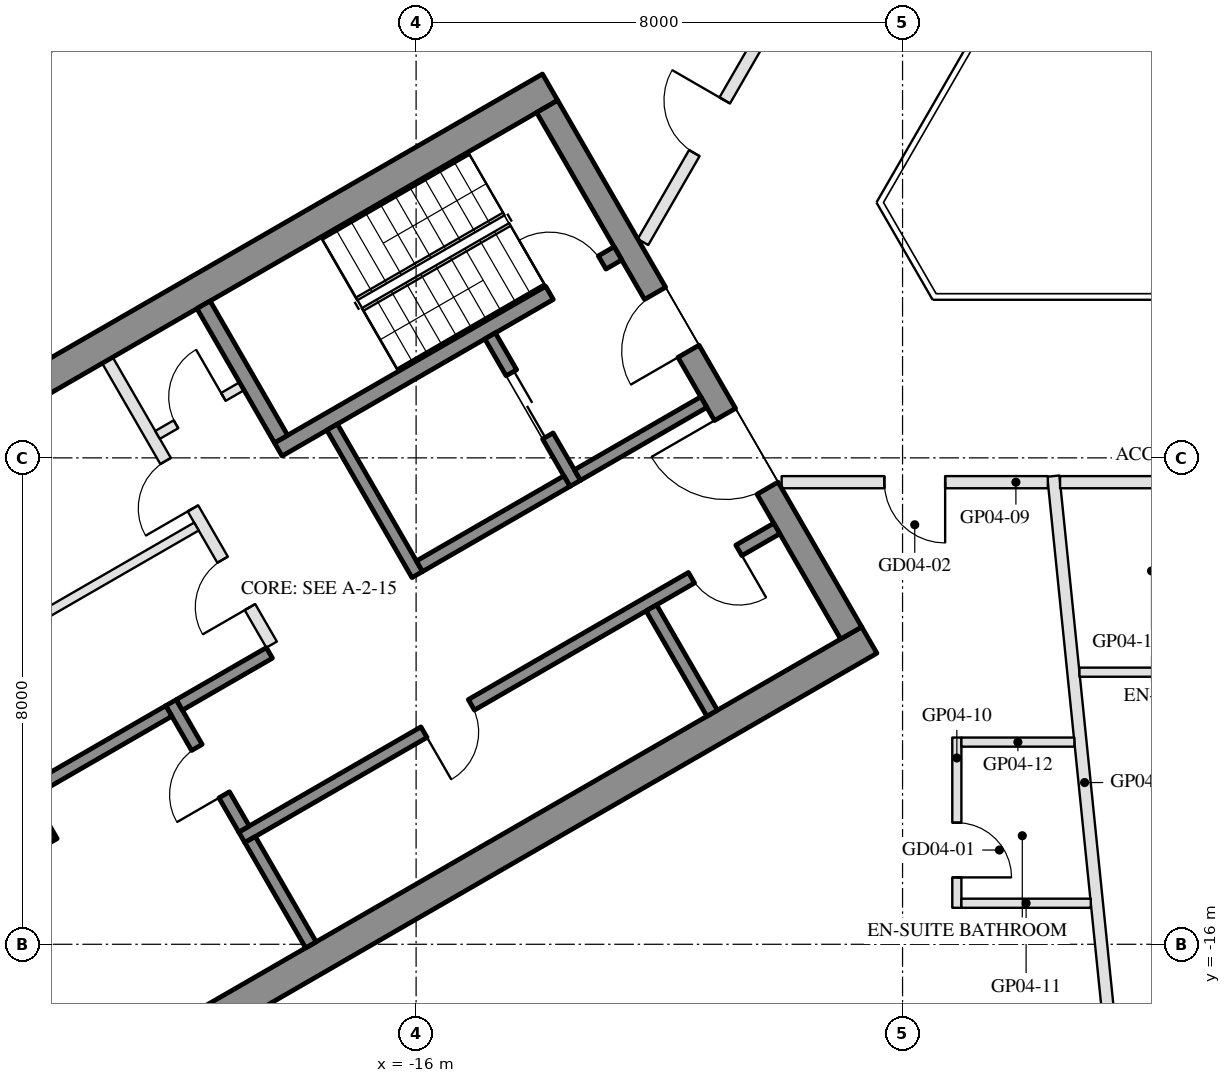
"""IFC4 building model, lengths in metres.
Left out: names, types, materials, properties, quantities, classifications, styles, units other than length and angle.
Written with IfcOpenShell. Run it as: python <this file> out.ifc"""

import sys

from ifc_helpers import new_model, si_unit, direction, frame, frame_2d, origin, origin_2d, place, context, subcontext, project, spatial, rectangle, hollow_rectangle, extrude, element, fill, save


model = new_model("IFC4")
c1 = context("Model", 3, precision=1e-05, world=origin(), true_north=direction((0.0, 1.0)))
c2 = subcontext(c1, "Body", "Model", "MODEL_VIEW")
j1 = project(units=[si_unit("LENGTHUNIT", "METRE"), si_unit("PLANEANGLEUNIT", "RADIAN")], contexts=[c1])
p1 = place(None, origin())
s1 = spatial("IfcSite", under=j1, at=p1, CompositionType="ELEMENT")
p2 = place(p1, origin())
s2 = spatial("IfcBuilding", under=s1, at=p2, CompositionType="ELEMENT")
p3 = place(p2, frame((0.0, 0.0, 76.1)))
s3 = spatial("IfcBuildingStorey", under=s2, at=p3, CompositionType="ELEMENT", Elevation=76.1)
p4 = place(p3, frame((-23.643, -13.65, 0.0), z_axis=(0.0, 0.0, 1.0), x_axis=(-0.5, 0.866025403784, 0.0)))
e1 = element("IfcColumn", 1, at=p4, inside=s3, PredefinedType="COLUMN", context=c2, shape_type="SweptSolid", body=[
    extrude(hollow_rectangle(XDim=2.8, YDim=2.4, WallThickness=0.07, at=origin_2d()), origin(), (0.0, 0.0, 1.0), 3.7),
])
p5 = place(p3, frame((-20.309, 1.934, 0.0), z_axis=(0.0, 0.0, 1.0), x_axis=(-0.499992114976, -0.866029956157, 0.0)))
e2 = element("IfcWall", 2, at=p5, inside=s3, PredefinedType="SOLIDWALL", context=c2, shape_type="SweptSolid", body=[
    extrude(rectangle(XDim=6.74, YDim=0.35, at=frame_2d((3.37, 0.0))), origin(), (0.0, 0.0, 1.0), 3.55),
])
p6 = place(p5, frame((0.32, 0.0, 0.0)))
e3 = element("IfcOpeningElement", 3, at=p6, cuts=e2, PredefinedType="OPENING", context=c2, shape_type="SweptSolid", body=[
    extrude(rectangle(XDim=2.4, YDim=2.4, at=frame_2d((1.2, 1.2))), frame((0.0, 0.185, 0.0), z_axis=(0.0, -1.0, 0.0), x_axis=(1.0, 0.0, 0.0)), (0.0, 0.0, 1.0), 0.37),
])
p7 = place(p5, frame((3.02, 0.0, 0.3)))
e4 = element("IfcOpeningElement", 4, at=p7, cuts=e2, PredefinedType="OPENING", context=c2, shape_type="SweptSolid", body=[
    extrude(rectangle(XDim=1.5, YDim=2.65, at=frame_2d((0.75, 1.325))), frame((0.0, 0.185, 0.0), z_axis=(0.0, -1.0, 0.0), x_axis=(1.0, 0.0, 0.0)), (0.0, 0.0, 1.0), 0.37),
])
p8 = place(p5, frame((4.82, 0.0, 0.3)))
e5 = element("IfcOpeningElement", 5, at=p8, cuts=e2, PredefinedType="OPENING", context=c2, shape_type="SweptSolid", body=[
    extrude(rectangle(XDim=1.5, YDim=2.65, at=frame_2d((0.75, 1.325))), frame((0.0, 0.185, 0.0), z_axis=(0.0, -1.0, 0.0), x_axis=(1.0, 0.0, 0.0)), (0.0, 0.0, 1.0), 0.37),
])
for number, where, z_axis, x_axis in (
    (6, (-13.797, -1.903, 0.0), (0.0, 0.0, 1.0), (-0.866, -0.5, 0.0)),
    (7, (-8.547, -10.997, 0.0), (0.0, 0.0, 1.0), (-0.866, -0.5, 0.0)),
):
    element("IfcWall", number, at=place(p3, frame(where, z_axis=z_axis, x_axis=x_axis)), inside=s3, PredefinedType="SHEAR", context=c2, shape_type="SweptSolid", body=[
        extrude(rectangle(XDim=14.837, YDim=0.5, at=frame_2d((7.418, 0.0))), origin(), (0.0, 0.0, 1.0), 3.5),
    ])
p9 = place(p3, frame((-13.845, -2.22, 0.0), z_axis=(0.0, 0.0, 1.0), x_axis=(0.500004234368, -0.866022959057, 0.0)))
e8 = element("IfcWall", 8, at=p9, inside=s3, PredefinedType="SHEAR", context=c2, shape_type="SweptSolid", body=[
    extrude(rectangle(XDim=10.0, YDim=0.4, at=frame_2d((5.0, 0.0))), origin(), (0.0, 0.0, 1.0), 3.5),
])
p10 = place(p9, frame((3.55, 0.0, 0.0)))
e9 = element("IfcOpeningElement", 9, at=p10, cuts=e8, PredefinedType="OPENING", context=c2, shape_type="SweptSolid", body=[
    extrude(rectangle(XDim=1.1, YDim=2.1, at=frame_2d((0.55, 1.05))), frame((0.0, 0.21, 0.0), z_axis=(0.0, -1.0, 0.0), x_axis=(1.0, 0.0, 0.0)), (0.0, 0.0, 1.0), 0.42),
])
p11 = place(p9, frame((5.85, 0.0, 0.0)))
e10 = element("IfcOpeningElement", 10, at=p11, cuts=e8, PredefinedType="OPENING", context=c2, shape_type="SweptSolid", body=[
    extrude(rectangle(XDim=1.4, YDim=2.1, at=frame_2d((0.7, 1.05))), frame((0.0, 0.21, 0.0), z_axis=(0.0, -1.0, 0.0), x_axis=(1.0, 0.0, 0.0)), (0.0, 0.0, 1.0), 0.42),
])
p12 = place(p3, frame((-12.681, -4.636, 0.0), z_axis=(0.0, 0.0, 1.0), x_axis=(-0.866021702275, -0.500006411147, 0.0)))
e11 = element("IfcWall", 11, at=p12, inside=s3, PredefinedType="SHEAR", context=c2, shape_type="SweptSolid", body=[
    extrude(rectangle(XDim=6.45, YDim=0.25, at=frame_2d((3.225, 0.0))), origin(), (0.0, 0.0, 1.0), 3.5),
])
p13 = place(p12, frame((0.3, 0.0, 0.0)))
e12 = element("IfcOpeningElement", 12, at=p13, cuts=e11, PredefinedType="OPENING", context=c2, shape_type="SweptSolid", body=[
    extrude(rectangle(XDim=1.0, YDim=2.1, at=frame_2d((0.5, 1.05))), frame((0.0, 0.135, 0.0), z_axis=(0.0, -1.0, 0.0), x_axis=(1.0, 0.0, 0.0)), (0.0, 0.0, 1.0), 0.27),
])
p14 = place(p3, frame((-19.496, -5.482, 0.0), z_axis=(0.0, 0.0, 1.0), x_axis=(0.499990435942, -0.866030925526, 0.0)))
e13 = element("IfcWall", 13, at=p14, inside=s3, PredefinedType="SHEAR", context=c2, shape_type="SweptSolid", body=[
    extrude(rectangle(XDim=2.55, YDim=0.25, at=frame_2d((1.275, 0.0))), origin(), (0.0, 0.0, 1.0), 3.5),
])
p15 = place(p3, frame((-17.381, -7.495, 0.0), z_axis=(0.0, 0.0, 1.0), x_axis=(0.500011755427, -0.866018616679, 0.0)))
e14 = element("IfcWall", 14, at=p15, inside=s3, PredefinedType="SHEAR", context=c2, shape_type="SweptSolid", body=[
    extrude(rectangle(XDim=2.8, YDim=0.2, at=frame_2d((1.4, 0.0))), origin(), (0.0, 0.0, 1.0), 3.5),
])
p16 = place(p3, frame((-14.783, -5.995, 0.0), z_axis=(0.0, 0.0, 1.0), x_axis=(0.49994636267, -0.866056369097, 0.0)))
e15 = element("IfcWall", 15, at=p16, inside=s3, PredefinedType="SHEAR", context=c2, shape_type="SweptSolid", body=[
    extrude(rectangle(XDim=2.8, YDim=0.2, at=frame_2d((1.4, 0.0))), origin(), (0.0, 0.0, 1.0), 3.5),
])
p17 = place(p16, frame((0.7, 0.0, 0.0)))
e16 = element("IfcOpeningElement", 16, at=p17, cuts=e15, PredefinedType="OPENING", context=c2, shape_type="SweptSolid", body=[
    extrude(rectangle(XDim=1.2, YDim=2.1, at=frame_2d((0.6, 1.05))), frame((0.0, 0.11, 0.0), z_axis=(0.0, -1.0, 0.0), x_axis=(1.0, 0.0, 0.0)), (0.0, 0.0, 1.0), 0.22),
])
p18 = place(p3, frame((-13.52, -8.383, 0.0), z_axis=(0.0, 0.0, 1.0), x_axis=(-0.866034573852, -0.49998411664, 0.0)))
e17 = element("IfcWall", 17, at=p18, inside=s3, PredefinedType="SHEAR", context=c2, shape_type="SweptSolid", body=[
    extrude(rectangle(XDim=2.8, YDim=0.2, at=frame_2d((1.4, 0.0))), origin(), (0.0, 0.0, 1.0), 3.5),
])
p19 = place(p3, frame((-11.268, -7.083, 0.0), z_axis=(0.0, 0.0, 1.0), x_axis=(-0.866050077142, -0.499957262057, 0.0)))
e18 = element("IfcWall", 18, at=p19, inside=s3, PredefinedType="SHEAR", context=c2, shape_type="SweptSolid", body=[
    extrude(rectangle(XDim=2.4, YDim=0.2, at=frame_2d((1.2, 0.0))), origin(), (0.0, 0.0, 1.0), 3.5),
])
p20 = place(p3, frame((-10.068, -9.162, 0.0), z_axis=(0.0, 0.0, 1.0), x_axis=(-0.866032725843, -0.499987317609, 0.0)))
e19 = element("IfcWall", 19, at=p20, inside=s3, PredefinedType="SHEAR", context=c2, shape_type="SweptSolid", body=[
    extrude(rectangle(XDim=10.16, YDim=0.2, at=frame_2d((5.08, 0.0))), origin(), (0.0, 0.0, 1.0), 3.5),
])
p21 = place(p20, frame((0.72, 0.0, 0.0)))
e20 = element("IfcOpeningElement", 20, at=p21, cuts=e19, PredefinedType="OPENING", context=c2, shape_type="SweptSolid", body=[
    extrude(rectangle(XDim=0.9, YDim=2.1, at=frame_2d((0.45, 1.05))), frame((0.0, 0.11, 0.0), z_axis=(0.0, -1.0, 0.0), x_axis=(1.0, 0.0, 0.0)), (0.0, 0.0, 1.0), 0.22),
])
p22 = place(p20, frame((5.8, 0.0, 0.0)))
e21 = element("IfcOpeningElement", 21, at=p22, cuts=e19, PredefinedType="OPENING", context=c2, shape_type="SweptSolid", body=[
    extrude(rectangle(XDim=0.9, YDim=2.1, at=frame_2d((0.45, 1.05))), frame((0.0, 0.11, 0.0), z_axis=(0.0, -1.0, 0.0), x_axis=(1.0, 0.0, 0.0)), (0.0, 0.0, 1.0), 0.22),
])
p23 = place(p3, frame((-20.031, -12.026, 0.0), z_axis=(0.0, 0.0, 1.0), x_axis=(0.500033551112, -0.866006032174, 0.0)))
e22 = element("IfcWall", 22, at=p23, inside=s3, PredefinedType="SHEAR", context=c2, shape_type="SweptSolid", body=[
    extrude(rectangle(XDim=2.4, YDim=0.2, at=frame_2d((1.2, 0.0))), origin(), (0.0, 0.0, 1.0), 3.5),
])
p24 = place(p23, frame((0.85, 0.0, 0.0)))
e23 = element("IfcOpeningElement", 23, at=p24, cuts=e22, PredefinedType="OPENING", context=c2, shape_type="SweptSolid", body=[
    extrude(rectangle(XDim=0.9, YDim=2.1, at=frame_2d((0.45, 1.05))), frame((0.0, 0.11, 0.0), z_axis=(0.0, -1.0, 0.0), x_axis=(1.0, 0.0, 0.0)), (0.0, 0.0, 1.0), 0.22),
])
p25 = place(p3, frame((-18.413, -11.208, 0.0), z_axis=(0.0, 0.0, 1.0), x_axis=(-0.866038183914, -0.499977863513, 0.0)))
e24 = element("IfcWall", 24, at=p25, inside=s3, PredefinedType="SHEAR", context=c2, shape_type="SweptSolid", body=[
    extrude(rectangle(XDim=1.71, YDim=0.2, at=frame_2d((0.855, 0.0))), origin(), (0.0, 0.0, 1.0), 3.5),
])
for number, where, z_axis, x_axis in (
    (25, (-12.131, -10.468, 0.0), (0.0, 0.0, 1.0), (0.5, -0.866, 0.0)),
    (26, (-18.73, -14.278, 0.0), (0.0, 0.0, 1.0), (0.5, -0.866, 0.0)),
):
    element("IfcWall", number, at=place(p3, frame(where, z_axis=z_axis, x_axis=x_axis)), inside=s3, PredefinedType="SHEAR", context=c2, shape_type="SweptSolid", body=[
        extrude(rectangle(XDim=2.0, YDim=0.2, at=frame_2d((1.0, 0.0))), origin(), (0.0, 0.0, 1.0), 3.5),
    ])
p26 = place(p3, frame((-20.067, -12.163, 0.0), z_axis=(0.0, 0.0, 1.0), x_axis=(-0.866060851709, -0.499938597367, 0.0)))
e27 = element("IfcWall", 27, at=p26, inside=s3, PredefinedType="SHEAR", context=c2, shape_type="SweptSolid", body=[
    extrude(rectangle(XDim=2.64, YDim=0.2, at=frame_2d((1.32, 0.0))), origin(), (0.0, 0.0, 1.0), 3.5),
])
p27 = place(p3, frame((-21.076, -6.395, 0.0), z_axis=(0.0, 0.0, 1.0), x_axis=(0.50001468107, -0.866016927499, 0.0)))
e28 = element("IfcWall", 28, at=p27, inside=s3, PredefinedType="PARTITIONING", context=c2, shape_type="SweptSolid", body=[
    extrude(rectangle(XDim=5.4, YDim=0.2, at=frame_2d((2.7, 0.0))), origin(), (0.0, 0.0, 1.0), 3.5),
])
p28 = place(p27, frame((1.913, 0.0, 0.0)))
e29 = element("IfcOpeningElement", 29, at=p28, cuts=e28, PredefinedType="OPENING", context=c2, shape_type="SweptSolid", body=[
    extrude(rectangle(XDim=0.9, YDim=2.1, at=frame_2d((0.45, 1.05))), frame((0.0, 0.11, 0.0), z_axis=(0.0, -1.0, 0.0), x_axis=(1.0, 0.0, 0.0)), (0.0, 0.0, 1.0), 0.22),
])
p29 = place(p27, frame((3.788, 0.0, 0.0)))
e30 = element("IfcOpeningElement", 30, at=p29, cuts=e28, PredefinedType="OPENING", context=c2, shape_type="SweptSolid", body=[
    extrude(rectangle(XDim=0.9, YDim=2.1, at=frame_2d((0.45, 1.05))), frame((0.0, 0.11, 0.0), z_axis=(0.0, -1.0, 0.0), x_axis=(1.0, 0.0, 0.0)), (0.0, 0.0, 1.0), 0.22),
])
p30 = place(p3, frame((-18.866, -6.822, 0.0), z_axis=(0.0, 0.0, 1.0), x_axis=(-0.866028054938, -0.499995408039, 0.0)))
e31 = element("IfcWall", 31, at=p30, inside=s3, PredefinedType="PARTITIONING", context=c2, shape_type="SweptSolid", body=[
    extrude(rectangle(XDim=1.6, YDim=0.15, at=frame_2d((0.8, 0.0))), origin(), (0.0, 0.0, 1.0), 3.5),
])
p31 = place(p30, frame((0.35, 0.0, 0.0)))
e32 = element("IfcOpeningElement", 32, at=p31, cuts=e31, PredefinedType="OPENING", context=c2, shape_type="SweptSolid", body=[
    extrude(rectangle(XDim=0.9, YDim=2.1, at=frame_2d((0.45, 1.05))), frame((0.0, 0.085, 0.0), z_axis=(0.0, -1.0, 0.0), x_axis=(1.0, 0.0, 0.0)), (0.0, 0.0, 1.0), 0.17),
])
p32 = place(p3, frame((-19.613, -9.13, 0.0), z_axis=(0.0, 0.0, 1.0), x_axis=(-0.866031734426, -0.499989034847, 0.0)))
e33 = element("IfcWall", 33, at=p32, inside=s3, PredefinedType="PARTITIONING", context=c2, shape_type="SweptSolid", body=[
    extrude(rectangle(XDim=6.95, YDim=0.15, at=frame_2d((3.475, 0.0))), origin(), (0.0, 0.0, 1.0), 3.5),
])
p33 = place(p3, frame((-4.492, -18.38, 0.0), z_axis=(0.0, 0.0, 1.0), x_axis=(-0.101538508549, 0.994831609511, 0.0)))
e34 = element("IfcWall", 34, at=p33, inside=s3, PredefinedType="PARTITIONING", context=c2, shape_type="SweptSolid", body=[
    extrude(rectangle(XDim=10.132, YDim=0.2, at=frame_2d((5.066, 0.0))), origin(), (0.0, 0.0, 1.0), 2.96),
])
p34 = place(p3, frame((-5.611, -8.4, 0.0), z_axis=(0.0, 0.0, 1.0), x_axis=(-1.0, 0.0, 0.0)))
e35 = element("IfcWall", 35, at=p34, inside=s3, PredefinedType="PARTITIONING", context=c2, shape_type="SweptSolid", body=[
    extrude(rectangle(XDim=4.378, YDim=0.2, at=frame_2d((2.189, 0.0))), origin(), (0.0, 0.0, 1.0), 2.95),
])
p35 = place(p34, frame((1.689, 0.0, 0.0)))
e36 = element("IfcOpeningElement", 36, at=p35, cuts=e35, PredefinedType="OPENING", context=c2, shape_type="SweptSolid", body=[
    extrude(rectangle(XDim=1.0, YDim=2.1, at=frame_2d((0.5, 1.05))), frame((0.0, 0.11, 0.0), z_axis=(0.0, -1.0, 0.0), x_axis=(1.0, 0.0, 0.0)), (0.0, 0.0, 1.0), 0.22),
])
p36 = place(p3, frame((-7.107, -12.6, 0.0), z_axis=(0.0, 0.0, 1.0), x_axis=(0.0, -1.0, 0.0)))
e37 = element("IfcWall", 37, at=p36, inside=s3, PredefinedType="PARTITIONING", context=c2, shape_type="SweptSolid", body=[
    extrude(rectangle(XDim=2.8, YDim=0.15, at=frame_2d((1.4, 0.0))), origin(), (0.0, 0.0, 1.0), 3.55),
])
p37 = place(p36, frame((1.4, 0.0, 0.0)))
e38 = element("IfcOpeningElement", 38, at=p37, cuts=e37, PredefinedType="OPENING", context=c2, shape_type="SweptSolid", body=[
    extrude(rectangle(XDim=0.9, YDim=2.1, at=frame_2d((0.45, 1.05))), frame((0.0, 0.085, 0.0), z_axis=(0.0, -1.0, 0.0), x_axis=(1.0, 0.0, 0.0)), (0.0, 0.0, 1.0), 0.17),
])
p38 = place(p3, frame((-7.032, -15.325, 0.0), z_axis=(0.0, 0.0, 1.0), x_axis=(1.0, 0.0, 0.0)))
e39 = element("IfcWall", 39, at=p38, inside=s3, PredefinedType="PARTITIONING", context=c2, shape_type="SweptSolid", body=[
    extrude(rectangle(XDim=2.128, YDim=0.15, at=frame_2d((1.064, 0.0))), origin(), (0.0, 0.0, 1.0), 3.55),
])
p39 = place(p3, frame((-7.032, -12.675, 0.0), z_axis=(0.0, 0.0, 1.0), x_axis=(1.0, 0.0, 0.0)))
e40 = element("IfcWall", 40, at=p39, inside=s3, PredefinedType="PARTITIONING", context=c2, shape_type="SweptSolid", body=[
    extrude(rectangle(XDim=1.858, YDim=0.15, at=frame_2d((0.929, 0.0))), origin(), (0.0, 0.0, 1.0), 3.55),
])
p40 = place(p3, frame((-0.201, -8.4, 0.0), z_axis=(0.0, 0.0, 1.0), x_axis=(-1.0, 0.0, 0.0)))
e41 = element("IfcWall", 41, at=p40, inside=s3, PredefinedType="PARTITIONING", context=c2, shape_type="SweptSolid", body=[
    extrude(rectangle(XDim=5.209, YDim=0.2, at=frame_2d((2.604, 0.0))), origin(), (0.0, 0.0, 1.0), 2.95),
])
p41 = place(p40, frame((0.749, 0.0, 0.0)))
e42 = element("IfcOpeningElement", 42, at=p41, cuts=e41, PredefinedType="OPENING", context=c2, shape_type="SweptSolid", body=[
    extrude(rectangle(XDim=1.0, YDim=2.1, at=frame_2d((0.5, 1.05))), frame((0.0, 0.11, 0.0), z_axis=(0.0, -1.0, 0.0), x_axis=(1.0, 0.0, 0.0)), (0.0, 0.0, 1.0), 0.22),
])
p42 = place(p3, frame((-5.091, -11.525, 0.0), z_axis=(0.0, 0.0, 1.0), x_axis=(1.0, 0.0, 0.0)))
e43 = element("IfcWall", 43, at=p42, inside=s3, PredefinedType="PARTITIONING", context=c2, shape_type="SweptSolid", body=[
    extrude(rectangle(XDim=2.541, YDim=0.15, at=frame_2d((1.271, 0.0))), origin(), (0.0, 0.0, 1.0), 2.95),
])
p43 = place(p3, frame((-12.269, -4.45, 0.0), z_axis=(0.0, 0.0, 1.0), x_axis=(0.499996027077, 0.86602769754, 0.0)))
e44 = element("IfcWall", 44, at=p43, inside=s3, PredefinedType="PARTITIONING", context=c2, shape_type="SweptSolid", body=[
    extrude(rectangle(XDim=4.377, YDim=0.2, at=frame_2d((2.189, 0.0))), origin(), (0.0, 0.0, 1.0), 2.95),
])
p44 = place(p43, frame((1.689, 0.0, 0.0)))
e45 = element("IfcOpeningElement", 45, at=p44, cuts=e44, PredefinedType="OPENING", context=c2, shape_type="SweptSolid", body=[
    extrude(rectangle(XDim=1.0, YDim=2.1, at=frame_2d((0.5, 1.05))), frame((0.0, 0.11, 0.0), z_axis=(0.0, -1.0, 0.0), x_axis=(1.0, 0.0, 0.0)), (0.0, 0.0, 1.0), 0.22),
])
p45 = place(p7, origin())
e46 = element("IfcWindow", 46, at=p45, inside=s3, PartitioningType="SINGLE_PANEL", PredefinedType="WINDOW", context=c2, shape_type="SweptSolid", body=[
    extrude(rectangle(XDim=1.5, YDim=2.65, at=frame_2d((0.75, 1.325))), frame((0.0, 0.03, 0.0), z_axis=(0.0, -1.0, 0.0), x_axis=(1.0, 0.0, 0.0)), (0.0, 0.0, 1.0), 0.06),
])
fill(e4, e46)
p46 = place(p17, origin())
e47 = element("IfcDoor", 47, at=p46, inside=s3, OperationType="DOUBLE_DOOR_SLIDING", PredefinedType="DOOR", context=c2, shape_type="SweptSolid", body=[
    extrude(rectangle(XDim=1.2, YDim=2.1, at=frame_2d((0.6, 1.05))), frame((0.0, 0.025, 0.0), z_axis=(0.0, -1.0, 0.0), x_axis=(1.0, 0.0, 0.0)), (0.0, 0.0, 1.0), 0.05),
])
fill(e16, e47)
p47 = place(p31, frame((0.9, 0.0, 0.0), z_axis=(0.0, 0.0, 1.0), x_axis=(-1.0, 0.0, 0.0)))
e48 = element("IfcDoor", 48, at=p47, inside=s3, OperationType="SINGLE_SWING_RIGHT", PredefinedType="DOOR", context=c2, shape_type="SweptSolid", body=[
    extrude(rectangle(XDim=0.9, YDim=2.1, at=frame_2d((0.45, 1.05))), frame((0.0, 0.025, 0.0), z_axis=(0.0, -1.0, 0.0), x_axis=(1.0, 0.0, 0.0)), (0.0, 0.0, 1.0), 0.05),
])
fill(e32, e48)
p48 = place(p21, origin())
e49 = element("IfcDoor", 49, at=p48, inside=s3, OperationType="SINGLE_SWING_LEFT", PredefinedType="DOOR", context=c2, shape_type="SweptSolid", body=[
    extrude(rectangle(XDim=0.9, YDim=2.1, at=frame_2d((0.45, 1.05))), frame((0.0, 0.025, 0.0), z_axis=(0.0, -1.0, 0.0), x_axis=(1.0, 0.0, 0.0)), (0.0, 0.0, 1.0), 0.05),
])
fill(e20, e49)
p49 = place(p22, origin())
e50 = element("IfcDoor", 50, at=p49, inside=s3, OperationType="SINGLE_SWING_RIGHT", PredefinedType="DOOR", context=c2, shape_type="SweptSolid", body=[
    extrude(rectangle(XDim=0.9, YDim=2.1, at=frame_2d((0.45, 1.05))), frame((0.0, 0.025, 0.0), z_axis=(0.0, -1.0, 0.0), x_axis=(1.0, 0.0, 0.0)), (0.0, 0.0, 1.0), 0.05),
])
fill(e21, e50)
p50 = place(p24, frame((0.9, 0.0, 0.0), z_axis=(0.0, 0.0, 1.0), x_axis=(-1.0, 0.0, 0.0)))
e51 = element("IfcDoor", 51, at=p50, inside=s3, OperationType="SINGLE_SWING_LEFT", PredefinedType="DOOR", context=c2, shape_type="SweptSolid", body=[
    extrude(rectangle(XDim=0.9, YDim=2.1, at=frame_2d((0.45, 1.05))), frame((0.0, 0.025, 0.0), z_axis=(0.0, -1.0, 0.0), x_axis=(1.0, 0.0, 0.0)), (0.0, 0.0, 1.0), 0.05),
])
fill(e23, e51)
p51 = place(p28, frame((0.9, 0.0, 0.0), z_axis=(0.0, 0.0, 1.0), x_axis=(-1.0, 0.0, 0.0)))
e52 = element("IfcDoor", 52, at=p51, inside=s3, OperationType="SINGLE_SWING_LEFT", PredefinedType="DOOR", context=c2, shape_type="SweptSolid", body=[
    extrude(rectangle(XDim=0.9, YDim=2.1, at=frame_2d((0.45, 1.05))), frame((0.0, 0.025, 0.0), z_axis=(0.0, -1.0, 0.0), x_axis=(1.0, 0.0, 0.0)), (0.0, 0.0, 1.0), 0.05),
])
fill(e29, e52)
p52 = place(p29, frame((0.9, 0.0, 0.0), z_axis=(0.0, 0.0, 1.0), x_axis=(-1.0, 0.0, 0.0)))
e53 = element("IfcDoor", 53, at=p52, inside=s3, OperationType="SINGLE_SWING_LEFT", PredefinedType="DOOR", context=c2, shape_type="SweptSolid", body=[
    extrude(rectangle(XDim=0.9, YDim=2.1, at=frame_2d((0.45, 1.05))), frame((0.0, 0.025, 0.0), z_axis=(0.0, -1.0, 0.0), x_axis=(1.0, 0.0, 0.0)), (0.0, 0.0, 1.0), 0.05),
])
fill(e30, e53)
p53 = place(p10, frame((1.1, 0.0, 0.0), z_axis=(0.0, 0.0, 1.0), x_axis=(-1.0, 0.0, 0.0)))
e54 = element("IfcDoor", 54, at=p53, inside=s3, OperationType="SINGLE_SWING_LEFT", PredefinedType="DOOR", context=c2, shape_type="SweptSolid", body=[
    extrude(rectangle(XDim=1.1, YDim=2.1, at=frame_2d((0.55, 1.05))), frame((0.0, 0.025, 0.0), z_axis=(0.0, -1.0, 0.0), x_axis=(1.0, 0.0, 0.0)), (0.0, 0.0, 1.0), 0.05),
])
fill(e9, e54)
p54 = place(p11, frame((1.4, 0.0, 0.0), z_axis=(0.0, 0.0, 1.0), x_axis=(-1.0, 0.0, 0.0)))
e55 = element("IfcDoor", 55, at=p54, inside=s3, OperationType="DOUBLE_DOOR_SINGLE_SWING", PredefinedType="DOOR", context=c2, shape_type="SweptSolid", body=[
    extrude(rectangle(XDim=1.4, YDim=2.1, at=frame_2d((0.7, 1.05))), frame((0.0, 0.025, 0.0), z_axis=(0.0, -1.0, 0.0), x_axis=(1.0, 0.0, 0.0)), (0.0, 0.0, 1.0), 0.05),
])
fill(e10, e55)
p55 = place(p13, frame((1.0, 0.0, 0.0), z_axis=(0.0, 0.0, 1.0), x_axis=(-1.0, 0.0, 0.0)))
e56 = element("IfcDoor", 56, at=p55, inside=s3, OperationType="SINGLE_SWING_LEFT", PredefinedType="DOOR", context=c2, shape_type="SweptSolid", body=[
    extrude(rectangle(XDim=1.0, YDim=2.1, at=frame_2d((0.5, 1.05))), frame((0.0, 0.025, 0.0), z_axis=(0.0, -1.0, 0.0), x_axis=(1.0, 0.0, 0.0)), (0.0, 0.0, 1.0), 0.05),
])
fill(e12, e56)
p56 = place(p37, origin())
e57 = element("IfcDoor", 57, at=p56, inside=s3, OperationType="SINGLE_SWING_RIGHT", PredefinedType="DOOR", context=c2, shape_type="SweptSolid", body=[
    extrude(rectangle(XDim=0.9, YDim=2.1, at=frame_2d((0.45, 1.05))), frame((0.0, 0.025, 0.0), z_axis=(0.0, -1.0, 0.0), x_axis=(1.0, 0.0, 0.0)), (0.0, 0.0, 1.0), 0.05),
])
fill(e38, e57)
p57 = place(p35, origin())
e58 = element("IfcDoor", 58, at=p57, inside=s3, OperationType="SINGLE_SWING_LEFT", PredefinedType="DOOR", context=c2, shape_type="SweptSolid", body=[
    extrude(rectangle(XDim=1.0, YDim=2.1, at=frame_2d((0.5, 1.05))), frame((0.0, 0.025, 0.0), z_axis=(0.0, -1.0, 0.0), x_axis=(1.0, 0.0, 0.0)), (0.0, 0.0, 1.0), 0.05),
])
fill(e36, e58)
p58 = place(p44, origin())
e59 = element("IfcDoor", 59, at=p58, inside=s3, OperationType="SINGLE_SWING_RIGHT", PredefinedType="DOOR", context=c2, shape_type="SweptSolid", body=[
    extrude(rectangle(XDim=1.0, YDim=2.1, at=frame_2d((0.5, 1.05))), frame((0.0, 0.025, 0.0), z_axis=(0.0, -1.0, 0.0), x_axis=(1.0, 0.0, 0.0)), (0.0, 0.0, 1.0), 0.05),
])
fill(e45, e59)
save(model, sys.argv[1])
